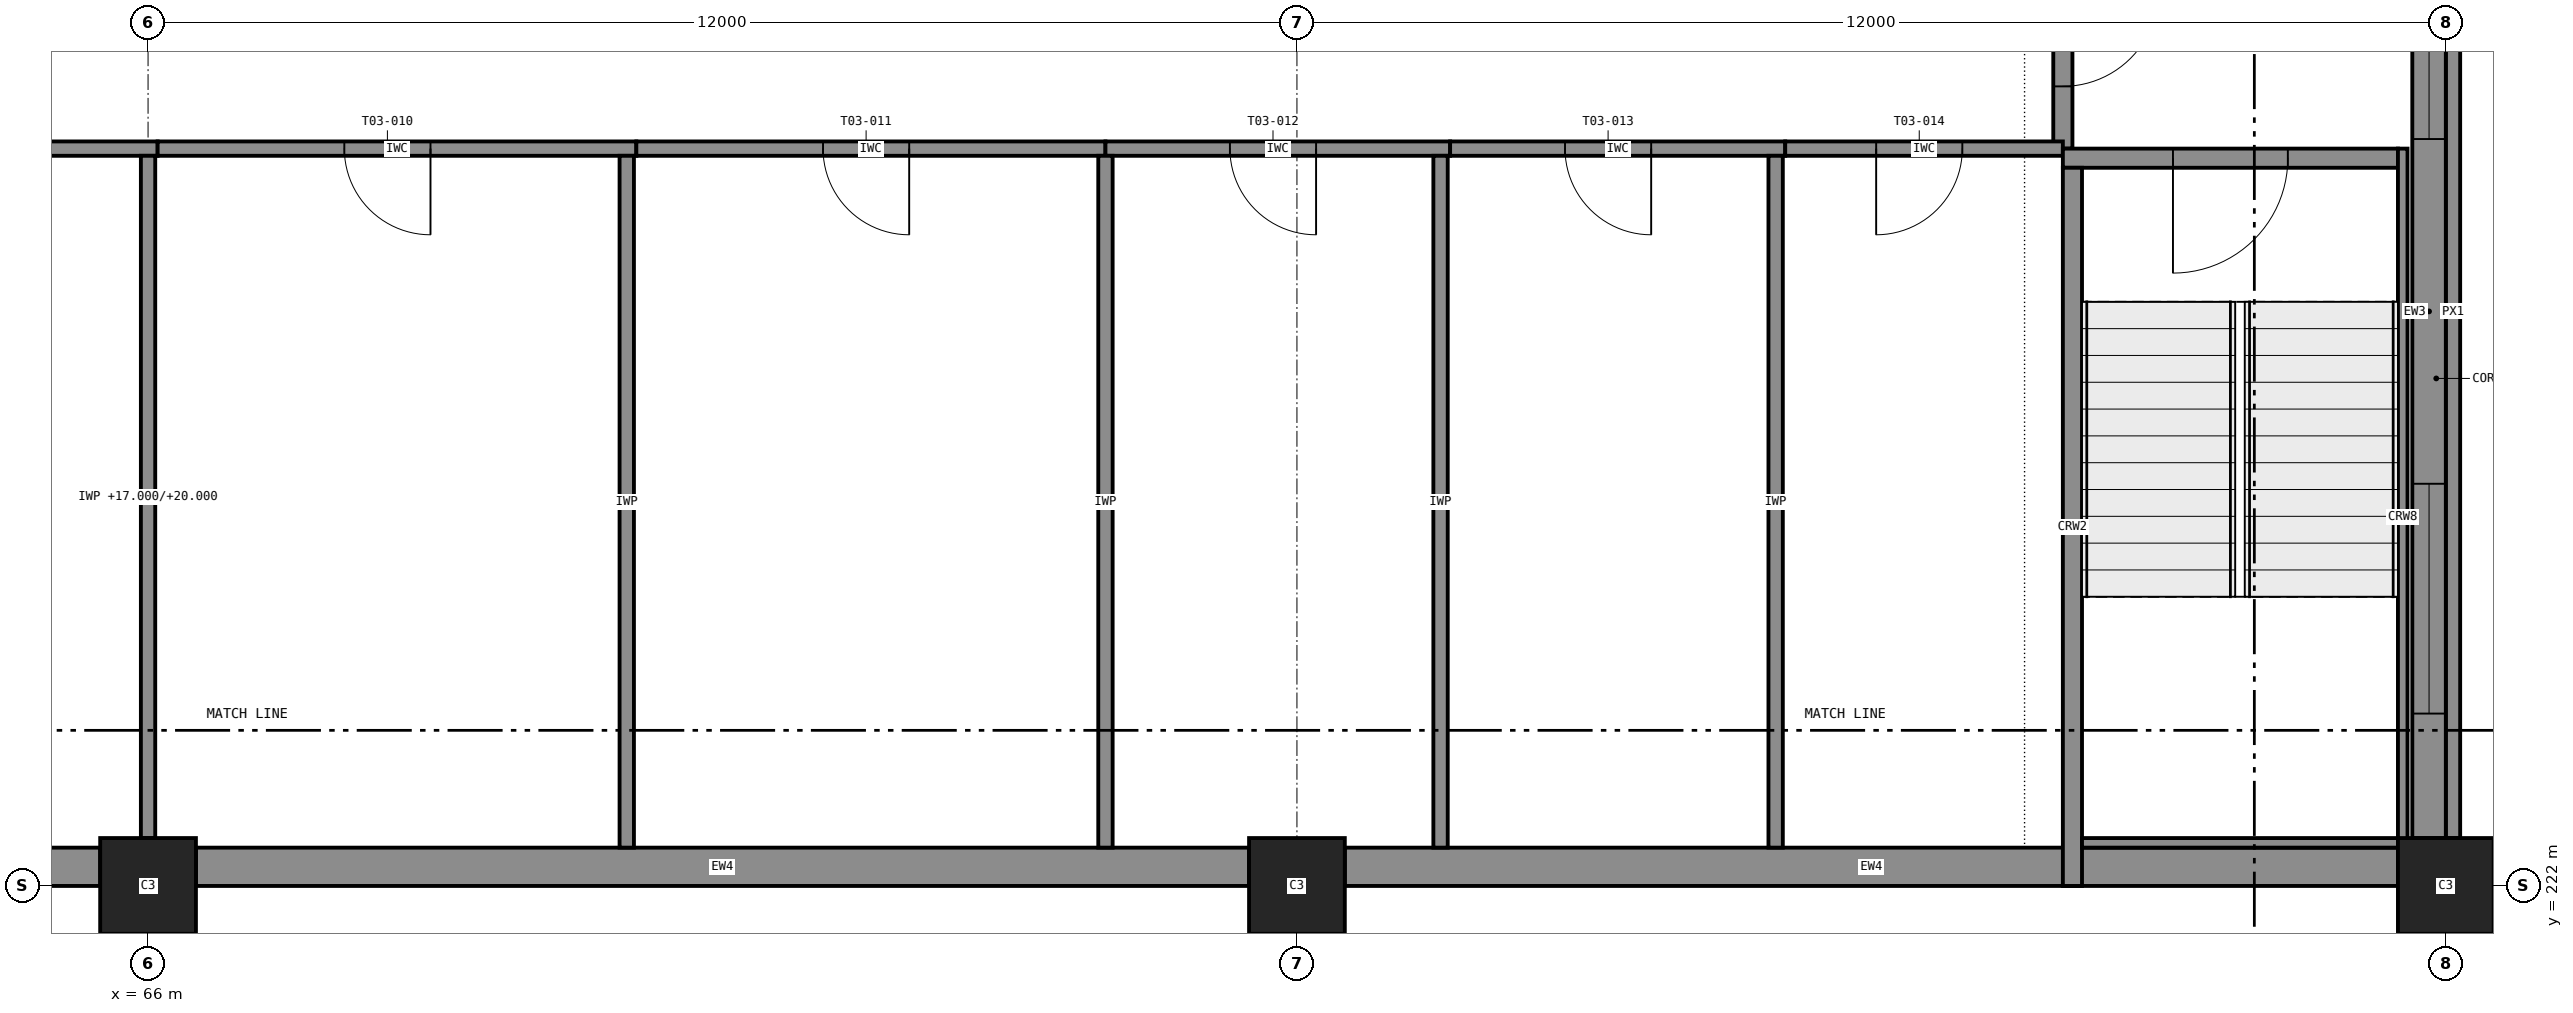
"""IFC4 building model, lengths in metres.
Left out: names, types, materials, properties, quantities, classifications, styles, units other than length and angle.
Written with IfcOpenShell. Run it as: python <this file> out.ifc"""

import sys

from ifc_helpers import new_model, si_unit, direction, frame, frame_2d, origin, origin_2d, place, context, subcontext, project, spatial, rectangle, extrude, element, fill, save


model = new_model("IFC4")
c1 = context("Model", 3, precision=1e-05, world=origin(), true_north=direction((0.0, 1.0)))
c2 = subcontext(c1, "Body", "Model", "MODEL_VIEW")
j1 = project(units=[si_unit("LENGTHUNIT", "METRE"), si_unit("PLANEANGLEUNIT", "RADIAN")], contexts=[c1])
p1 = place(None, origin())
s1 = spatial("IfcSite", under=j1, at=p1, CompositionType="ELEMENT")
p2 = place(p1, origin())
s2 = spatial("IfcBuilding", under=s1, at=p2, CompositionType="ELEMENT")
p3 = place(p2, frame((0.0, 0.0, 17.0)))
s3 = spatial("IfcBuildingStorey", under=s2, at=p3, CompositionType="ELEMENT", Elevation=17.0)
for number, where, z_axis, x_axis in (
    (1, (66.0, 222.0, 0.0), (0.0, 0.0, 1.0), (1.0, 0.0, 0.0)),
    (2, (78.0, 222.0, 0.0), (0.0, 0.0, 1.0), (1.0, 0.0, 0.0)),
    (3, (90.0, 222.0, 0.0), (0.0, 0.0, 1.0), (1.0, 0.0, 0.0)),
):
    element("IfcColumn", number, at=place(p3, frame(where, z_axis=z_axis, x_axis=x_axis)), inside=s3, PredefinedType="COLUMN", context=c2, shape_type="SweptSolid", body=[
        extrude(rectangle(XDim=1.0, YDim=1.0, at=origin_2d()), origin(), (0.0, 0.0, 1.0), 4.0),
    ])
p4 = place(p3, frame((89.5, 229.6, 0.0), z_axis=(0.0, 0.0, 1.0), x_axis=(-1.0, 0.0, 0.0)))
e4 = element("IfcWall", 4, at=p4, inside=s3, PredefinedType="SHEAR", context=c2, shape_type="SweptSolid", body=[
    extrude(rectangle(XDim=3.5, YDim=0.2, at=frame_2d((1.75, 0.0))), origin(), (0.0, 0.0, 1.0), 4.0),
])
p5 = place(p4, frame((1.15, 0.0, 0.0)))
e5 = element("IfcOpeningElement", 5, at=p5, cuts=e4, PredefinedType="OPENING", context=c2, shape_type="SweptSolid", body=[
    extrude(rectangle(XDim=1.2, YDim=2.1, at=frame_2d((0.6, 1.05))), frame((0.0, 0.11, 0.0), z_axis=(0.0, -1.0, 0.0), x_axis=(1.0, 0.0, 0.0)), (0.0, 0.0, 1.0), 0.22),
])
p6 = place(p3, frame((86.1, 222.0, 0.0), z_axis=(0.0, 0.0, 1.0), x_axis=(0.0, 1.0, 0.0)))
e6 = element("IfcWall", 6, at=p6, inside=s3, PredefinedType="SHEAR", context=c2, shape_type="SweptSolid", body=[
    extrude(rectangle(XDim=7.5, YDim=0.2, at=frame_2d((3.75, 0.0))), origin(), (0.0, 0.0, 1.0), 4.0),
])
p7 = place(p3, frame((89.55, 229.7, 0.0), z_axis=(0.0, 0.0, 1.0), x_axis=(0.0, -1.0, 0.0)))
e7 = element("IfcWall", 7, at=p7, inside=s3, PredefinedType="SHEAR", context=c2, shape_type="SweptSolid", body=[
    extrude(rectangle(XDim=7.7, YDim=0.1, at=frame_2d((3.85, 0.0))), origin(), (0.0, 0.0, 1.0), 3.8),
])
p8 = place(p3, frame((89.5, 222.45, 0.0), z_axis=(0.0, 0.0, 1.0), x_axis=(-1.0, 0.0, 0.0)))
e8 = element("IfcWall", 8, at=p8, inside=s3, PredefinedType="SHEAR", context=c2, shape_type="SweptSolid", body=[
    extrude(rectangle(XDim=3.3, YDim=0.1, at=frame_2d((1.65, 0.0))), origin(), (0.0, 0.0, 1.0), 3.8),
])
for number, where, z_axis, x_axis in (
    (9, (54.5, 222.2, 0.0), (0.0, 0.0, 1.0), (1.0, 0.0, 0.0)),
    (10, (66.5, 222.2, 0.0), (0.0, 0.0, 1.0), (1.0, 0.0, 0.0)),
    (11, (78.5, 222.2, 0.0), (0.0, 0.0, 1.0), (1.0, 0.0, 0.0)),
):
    element("IfcWall", number, at=place(p3, frame(where, z_axis=z_axis, x_axis=x_axis)), inside=s3, PredefinedType="SOLIDWALL", context=c2, shape_type="SweptSolid", body=[
        extrude(rectangle(XDim=11.0, YDim=0.4, at=frame_2d((5.5, 0.0))), origin(), (0.0, 0.0, 1.0), 3.0),
    ])
p9 = place(p3, frame((89.825, 222.5, 0.0), z_axis=(0.0, 0.0, 1.0), x_axis=(0.0, 1.0, 0.0)))
e12 = element("IfcWall", 12, at=p9, inside=s3, PredefinedType="STANDARD", context=c2, shape_type="SweptSolid", body=[
    extrude(rectangle(XDim=11.0, YDim=0.35, at=frame_2d((5.5, 0.0))), origin(), (0.0, 0.0, 1.0), 3.0),
])
p10 = place(p9, frame((1.3, 0.0, 0.6)))
e13 = element("IfcOpeningElement", 13, at=p10, cuts=e12, PredefinedType="OPENING", context=c2, shape_type="SweptSolid", body=[
    extrude(rectangle(XDim=2.4, YDim=2.4, at=frame_2d((1.2, 1.2))), frame((0.0, 0.185, 0.0), z_axis=(0.0, -1.0, 0.0), x_axis=(1.0, 0.0, 0.0)), (0.0, 0.0, 1.0), 0.37),
])
p11 = place(p9, frame((7.3, 0.0, 0.6)))
e14 = element("IfcOpeningElement", 14, at=p11, cuts=e12, PredefinedType="OPENING", context=c2, shape_type="SweptSolid", body=[
    extrude(rectangle(XDim=2.4, YDim=2.4, at=frame_2d((1.2, 1.2))), frame((0.0, 0.185, 0.0), z_axis=(0.0, -1.0, 0.0), x_axis=(1.0, 0.0, 0.0)), (0.0, 0.0, 1.0), 0.37),
])
p12 = place(p3, frame((90.075, 222.5, 3.8), z_axis=(0.0, 0.0, 1.0), x_axis=(0.0, 1.0, 0.0)))
e15 = element("IfcWall", 15, at=p12, inside=s3, PredefinedType="STANDARD", context=c2, shape_type="SweptSolid", body=[
    extrude(rectangle(XDim=11.0, YDim=0.15, at=frame_2d((5.5, 0.0))), origin(), (0.0, 0.0, 1.0), 0.2),
])
p13 = place(p3, frame((86.0, 232.0, 0.0), z_axis=(0.0, 0.0, 1.0), x_axis=(0.0, -1.0, 0.0)))
e16 = element("IfcWall", 16, at=p13, inside=s3, PredefinedType="PARTITIONING", context=c2, shape_type="SweptSolid", body=[
    extrude(rectangle(XDim=2.3, YDim=0.2, at=frame_2d((1.15, 0.0))), origin(), (0.0, 0.0, 1.0), 3.8),
])
p14 = place(p13, frame((0.65, 0.0, 0.0)))
e17 = element("IfcOpeningElement", 17, at=p14, cuts=e16, PredefinedType="OPENING", context=c2, shape_type="SweptSolid", body=[
    extrude(rectangle(XDim=1.0, YDim=2.1, at=frame_2d((0.5, 1.05))), frame((0.0, 0.11, 0.0), z_axis=(0.0, -1.0, 0.0), x_axis=(1.0, 0.0, 0.0)), (0.0, 0.0, 1.0), 0.22),
])
p15 = place(p3, frame((66.1, 229.7, 0.0), z_axis=(0.0, 0.0, 1.0), x_axis=(-1.0, 0.0, 0.0)))
e18 = element("IfcWall", 18, at=p15, inside=s3, PredefinedType="PARTITIONING", context=c2, shape_type="SweptSolid", body=[
    extrude(rectangle(XDim=23.7, YDim=0.15, at=frame_2d((11.85, 0.0))), origin(), (0.0, 0.0, 1.0), 3.8),
])
p16 = place(p15, frame((15.6, 0.0, 0.0)))
e19 = element("IfcOpeningElement", 19, at=p16, cuts=e18, PredefinedType="OPENING", context=c2, shape_type="SweptSolid", body=[
    extrude(rectangle(XDim=1.0, YDim=2.1, at=frame_2d((0.5, 1.05))), frame((0.0, 0.085, 0.0), z_axis=(0.0, -1.0, 0.0), x_axis=(1.0, 0.0, 0.0)), (0.0, 0.0, 1.0), 0.17),
])
p17 = place(p15, frame((6.6, 0.0, 0.0)))
e20 = element("IfcOpeningElement", 20, at=p17, cuts=e18, PredefinedType="OPENING", context=c2, shape_type="SweptSolid", body=[
    extrude(rectangle(XDim=1.0, YDim=2.1, at=frame_2d((0.5, 1.05))), frame((0.0, 0.085, 0.0), z_axis=(0.0, -1.0, 0.0), x_axis=(1.0, 0.0, 0.0)), (0.0, 0.0, 1.0), 0.17),
])
p18 = place(p3, frame((71.1, 229.7, 0.0), z_axis=(0.0, 0.0, 1.0), x_axis=(-1.0, 0.0, 0.0)))
e21 = element("IfcWall", 21, at=p18, inside=s3, PredefinedType="PARTITIONING", context=c2, shape_type="SweptSolid", body=[
    extrude(rectangle(XDim=5.0, YDim=0.15, at=frame_2d((2.5, 0.0))), origin(), (0.0, 0.0, 1.0), 3.8),
])
p19 = place(p18, frame((2.15, 0.0, 0.0)))
e22 = element("IfcOpeningElement", 22, at=p19, cuts=e21, PredefinedType="OPENING", context=c2, shape_type="SweptSolid", body=[
    extrude(rectangle(XDim=0.9, YDim=2.1, at=frame_2d((0.45, 1.05))), frame((0.0, 0.085, 0.0), z_axis=(0.0, -1.0, 0.0), x_axis=(1.0, 0.0, 0.0)), (0.0, 0.0, 1.0), 0.17),
])
p20 = place(p3, frame((66.0, 222.5, 0.0), z_axis=(0.0, 0.0, 1.0), x_axis=(0.0, 1.0, 0.0)))
e23 = element("IfcWall", 23, at=p20, inside=s3, PredefinedType="PARTITIONING", context=c2, shape_type="SweptSolid", body=[
    extrude(rectangle(XDim=7.125, YDim=0.15, at=frame_2d((3.562, 0.0))), origin(), (0.0, 0.0, 1.0), 3.0),
])
p21 = place(p3, frame((76.0, 229.7, 0.0), z_axis=(0.0, 0.0, 1.0), x_axis=(-1.0, 0.0, 0.0)))
e24 = element("IfcWall", 24, at=p21, inside=s3, PredefinedType="PARTITIONING", context=c2, shape_type="SweptSolid", body=[
    extrude(rectangle(XDim=4.9, YDim=0.15, at=frame_2d((2.45, 0.0))), origin(), (0.0, 0.0, 1.0), 3.8),
])
p22 = place(p21, frame((2.05, 0.0, 0.0)))
e25 = element("IfcOpeningElement", 25, at=p22, cuts=e24, PredefinedType="OPENING", context=c2, shape_type="SweptSolid", body=[
    extrude(rectangle(XDim=0.9, YDim=2.1, at=frame_2d((0.45, 1.05))), frame((0.0, 0.085, 0.0), z_axis=(0.0, -1.0, 0.0), x_axis=(1.0, 0.0, 0.0)), (0.0, 0.0, 1.0), 0.17),
])
p23 = place(p3, frame((71.0, 222.4, 0.0), z_axis=(0.0, 0.0, 1.0), x_axis=(0.0, 1.0, 0.0)))
e26 = element("IfcWall", 26, at=p23, inside=s3, PredefinedType="PARTITIONING", context=c2, shape_type="SweptSolid", body=[
    extrude(rectangle(XDim=7.225, YDim=0.15, at=frame_2d((3.613, 0.0))), origin(), (0.0, 0.0, 1.0), 3.8),
])
p24 = place(p3, frame((79.6, 229.7, 0.0), z_axis=(0.0, 0.0, 1.0), x_axis=(-1.0, 0.0, 0.0)))
e27 = element("IfcWall", 27, at=p24, inside=s3, PredefinedType="PARTITIONING", context=c2, shape_type="SweptSolid", body=[
    extrude(rectangle(XDim=3.6, YDim=0.15, at=frame_2d((1.8, 0.0))), origin(), (0.0, 0.0, 1.0), 3.8),
])
p25 = place(p24, frame((1.4, 0.0, 0.0)))
e28 = element("IfcOpeningElement", 28, at=p25, cuts=e27, PredefinedType="OPENING", context=c2, shape_type="SweptSolid", body=[
    extrude(rectangle(XDim=0.9, YDim=2.1, at=frame_2d((0.45, 1.05))), frame((0.0, 0.085, 0.0), z_axis=(0.0, -1.0, 0.0), x_axis=(1.0, 0.0, 0.0)), (0.0, 0.0, 1.0), 0.17),
])
p26 = place(p3, frame((76.0, 222.4, 0.0), z_axis=(0.0, 0.0, 1.0), x_axis=(0.0, 1.0, 0.0)))
e29 = element("IfcWall", 29, at=p26, inside=s3, PredefinedType="PARTITIONING", context=c2, shape_type="SweptSolid", body=[
    extrude(rectangle(XDim=7.225, YDim=0.15, at=frame_2d((3.613, 0.0))), origin(), (0.0, 0.0, 1.0), 3.8),
])
p27 = place(p3, frame((83.1, 229.7, 0.0), z_axis=(0.0, 0.0, 1.0), x_axis=(-1.0, 0.0, 0.0)))
e30 = element("IfcWall", 30, at=p27, inside=s3, PredefinedType="PARTITIONING", context=c2, shape_type="SweptSolid", body=[
    extrude(rectangle(XDim=3.5, YDim=0.15, at=frame_2d((1.75, 0.0))), origin(), (0.0, 0.0, 1.0), 3.8),
])
p28 = place(p27, frame((1.4, 0.0, 0.0)))
e31 = element("IfcOpeningElement", 31, at=p28, cuts=e30, PredefinedType="OPENING", context=c2, shape_type="SweptSolid", body=[
    extrude(rectangle(XDim=0.9, YDim=2.1, at=frame_2d((0.45, 1.05))), frame((0.0, 0.085, 0.0), z_axis=(0.0, -1.0, 0.0), x_axis=(1.0, 0.0, 0.0)), (0.0, 0.0, 1.0), 0.17),
])
p29 = place(p3, frame((79.5, 222.4, 0.0), z_axis=(0.0, 0.0, 1.0), x_axis=(0.0, 1.0, 0.0)))
e32 = element("IfcWall", 32, at=p29, inside=s3, PredefinedType="PARTITIONING", context=c2, shape_type="SweptSolid", body=[
    extrude(rectangle(XDim=7.225, YDim=0.15, at=frame_2d((3.613, 0.0))), origin(), (0.0, 0.0, 1.0), 3.8),
])
p30 = place(p3, frame((86.0, 229.7, 0.0), z_axis=(0.0, 0.0, 1.0), x_axis=(-1.0, 0.0, 0.0)))
e33 = element("IfcWall", 33, at=p30, inside=s3, PredefinedType="PARTITIONING", context=c2, shape_type="SweptSolid", body=[
    extrude(rectangle(XDim=2.9, YDim=0.15, at=frame_2d((1.45, 0.0))), origin(), (0.0, 0.0, 1.0), 3.8),
])
p31 = place(p30, frame((1.05, 0.0, 0.0)))
e34 = element("IfcOpeningElement", 34, at=p31, cuts=e33, PredefinedType="OPENING", context=c2, shape_type="SweptSolid", body=[
    extrude(rectangle(XDim=0.9, YDim=2.1, at=frame_2d((0.45, 1.05))), frame((0.0, 0.085, 0.0), z_axis=(0.0, -1.0, 0.0), x_axis=(1.0, 0.0, 0.0)), (0.0, 0.0, 1.0), 0.17),
])
p32 = place(p3, frame((83.0, 222.4, 0.0), z_axis=(0.0, 0.0, 1.0), x_axis=(0.0, 1.0, 0.0)))
e35 = element("IfcWall", 35, at=p32, inside=s3, PredefinedType="PARTITIONING", context=c2, shape_type="SweptSolid", body=[
    extrude(rectangle(XDim=7.225, YDim=0.15, at=frame_2d((3.613, 0.0))), origin(), (0.0, 0.0, 1.0), 3.8),
])
p33 = place(p10, origin())
e36 = element("IfcWindow", 36, at=p33, inside=s3, PartitioningType="SINGLE_PANEL", PredefinedType="WINDOW", context=c2, shape_type="SweptSolid", body=[
    extrude(rectangle(XDim=2.4, YDim=2.4, at=frame_2d((1.2, 1.2))), frame((0.0, 0.03, 0.0), z_axis=(0.0, -1.0, 0.0), x_axis=(1.0, 0.0, 0.0)), (0.0, 0.0, 1.0), 0.06),
])
fill(e13, e36)
p34 = place(p11, origin())
e37 = element("IfcWindow", 37, at=p34, inside=s3, PartitioningType="SINGLE_PANEL", PredefinedType="WINDOW", context=c2, shape_type="SweptSolid", body=[
    extrude(rectangle(XDim=2.4, YDim=2.4, at=frame_2d((1.2, 1.2))), frame((0.0, 0.03, 0.0), z_axis=(0.0, -1.0, 0.0), x_axis=(1.0, 0.0, 0.0)), (0.0, 0.0, 1.0), 0.06),
])
fill(e14, e37)
p35 = place(p14, origin())
e38 = element("IfcDoor", 38, at=p35, inside=s3, OperationType="SINGLE_SWING_LEFT", PredefinedType="DOOR", context=c2, shape_type="SweptSolid", body=[
    extrude(rectangle(XDim=1.0, YDim=2.1, at=frame_2d((0.5, 1.05))), frame((0.0, 0.025, 0.0), z_axis=(0.0, -1.0, 0.0), x_axis=(1.0, 0.0, 0.0)), (0.0, 0.0, 1.0), 0.05),
])
fill(e17, e38)
p36 = place(p19, origin())
e39 = element("IfcDoor", 39, at=p36, inside=s3, OperationType="SINGLE_SWING_LEFT", PredefinedType="DOOR", context=c2, shape_type="SweptSolid", body=[
    extrude(rectangle(XDim=0.9, YDim=2.1, at=frame_2d((0.45, 1.05))), frame((0.0, 0.025, 0.0), z_axis=(0.0, -1.0, 0.0), x_axis=(1.0, 0.0, 0.0)), (0.0, 0.0, 1.0), 0.05),
])
fill(e22, e39)
p37 = place(p22, origin())
e40 = element("IfcDoor", 40, at=p37, inside=s3, OperationType="SINGLE_SWING_LEFT", PredefinedType="DOOR", context=c2, shape_type="SweptSolid", body=[
    extrude(rectangle(XDim=0.9, YDim=2.1, at=frame_2d((0.45, 1.05))), frame((0.0, 0.025, 0.0), z_axis=(0.0, -1.0, 0.0), x_axis=(1.0, 0.0, 0.0)), (0.0, 0.0, 1.0), 0.05),
])
fill(e25, e40)
p38 = place(p25, origin())
e41 = element("IfcDoor", 41, at=p38, inside=s3, OperationType="SINGLE_SWING_LEFT", PredefinedType="DOOR", context=c2, shape_type="SweptSolid", body=[
    extrude(rectangle(XDim=0.9, YDim=2.1, at=frame_2d((0.45, 1.05))), frame((0.0, 0.025, 0.0), z_axis=(0.0, -1.0, 0.0), x_axis=(1.0, 0.0, 0.0)), (0.0, 0.0, 1.0), 0.05),
])
fill(e28, e41)
p39 = place(p28, origin())
e42 = element("IfcDoor", 42, at=p39, inside=s3, OperationType="SINGLE_SWING_LEFT", PredefinedType="DOOR", context=c2, shape_type="SweptSolid", body=[
    extrude(rectangle(XDim=0.9, YDim=2.1, at=frame_2d((0.45, 1.05))), frame((0.0, 0.025, 0.0), z_axis=(0.0, -1.0, 0.0), x_axis=(1.0, 0.0, 0.0)), (0.0, 0.0, 1.0), 0.05),
])
fill(e31, e42)
p40 = place(p31, origin())
e43 = element("IfcDoor", 43, at=p40, inside=s3, OperationType="SINGLE_SWING_RIGHT", PredefinedType="DOOR", context=c2, shape_type="SweptSolid", body=[
    extrude(rectangle(XDim=0.9, YDim=2.1, at=frame_2d((0.45, 1.05))), frame((0.0, 0.025, 0.0), z_axis=(0.0, -1.0, 0.0), x_axis=(1.0, 0.0, 0.0)), (0.0, 0.0, 1.0), 0.05),
])
fill(e34, e43)
p41 = place(p5, origin())
e44 = element("IfcDoor", 44, at=p41, inside=s3, OperationType="SINGLE_SWING_RIGHT", PredefinedType="DOOR", context=c2, shape_type="SweptSolid", body=[
    extrude(rectangle(XDim=1.2, YDim=2.1, at=frame_2d((0.6, 1.05))), frame((0.0, 0.025, 0.0), z_axis=(0.0, -1.0, 0.0), x_axis=(1.0, 0.0, 0.0)), (0.0, 0.0, 1.0), 0.05),
])
fill(e5, e44)
save(model, sys.argv[1])
